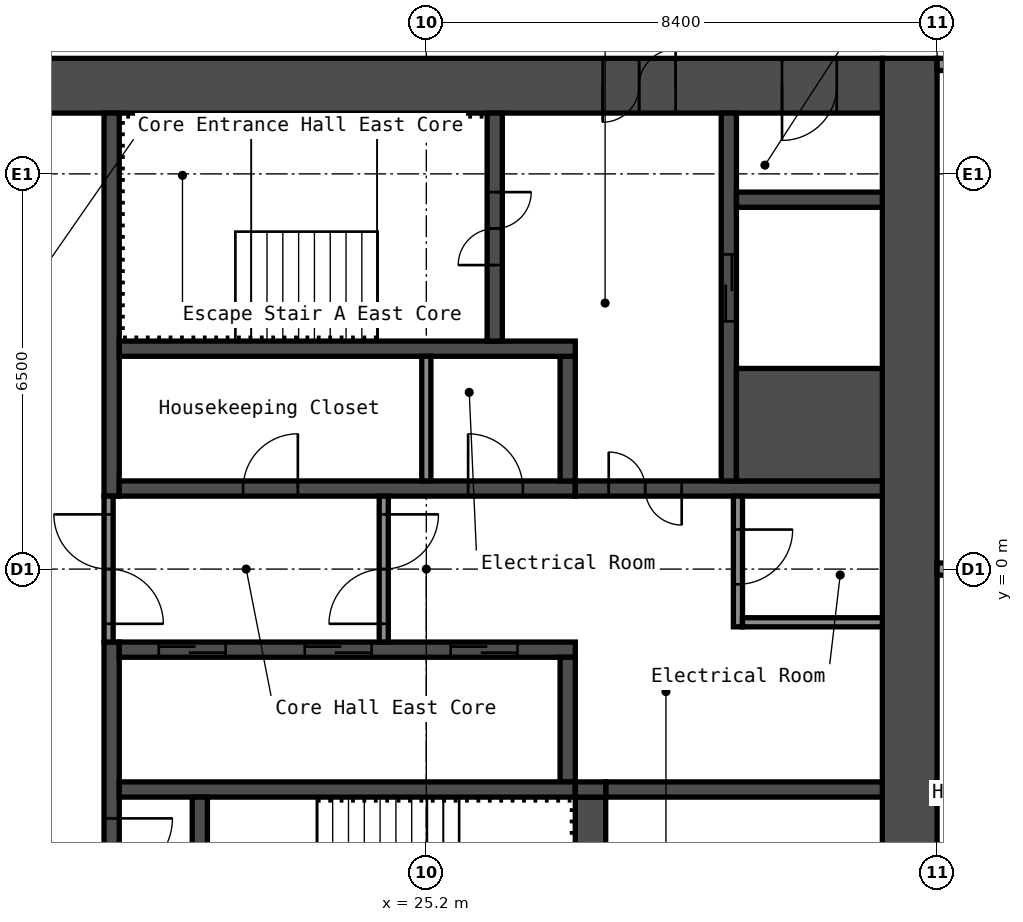
"""IFC4 building model, lengths in metres.
Left out: names, types, materials, properties, quantities, classifications, styles, units other than length and angle.
Written with IfcOpenShell. Run it as: python <this file> out.ifc"""

import sys

from ifc_helpers import new_model, si_unit, direction, frame, frame_2d, origin, place, context, subcontext, project, spatial, rectangle, extrude, element, fill, save


model = new_model("IFC4")
c1 = context("Model", 3, precision=1e-05, world=origin(), true_north=direction((0.0, 1.0)))
c2 = subcontext(c1, "Body", "Model", "MODEL_VIEW")
j1 = project(units=[si_unit("LENGTHUNIT", "METRE"), si_unit("PLANEANGLEUNIT", "RADIAN")], contexts=[c1])
p1 = place(None, origin())
s1 = spatial("IfcSite", under=j1, at=p1, CompositionType="ELEMENT")
p2 = place(p1, origin())
s2 = spatial("IfcBuilding", under=s1, at=p2, CompositionType="ELEMENT")
p3 = place(p2, frame((0.0, 0.0, 172.6)))
s3 = spatial("IfcBuildingStorey", under=s2, at=p3, CompositionType="ELEMENT", Elevation=172.6)
p4 = place(p3, frame((33.15, -8.4, 0.0), z_axis=(0.0, 0.0, 1.0), x_axis=(0.0, 1.0, 0.0)))
e1 = element("IfcWall", 1, at=p4, inside=s3, PredefinedType="SHEAR", context=c2, shape_type="SweptSolid", body=[
    extrude(rectangle(XDim=16.8, YDim=0.9, at=frame_2d((8.4, 0.0))), origin(), (0.0, 0.0, 1.0), 2.9),
])
p5 = place(p3, frame((17.7, 7.95, 0.0), z_axis=(0.0, 0.0, 1.0), x_axis=(1.0, 0.0, 0.0)))
e2 = element("IfcWall", 2, at=p5, inside=s3, PredefinedType="SHEAR", context=c2, shape_type="SweptSolid", body=[
    extrude(rectangle(XDim=15.0, YDim=0.9, at=frame_2d((7.5, 0.0))), origin(), (0.0, 0.0, 1.0), 2.9),
])
p6 = place(p5, frame((10.4, 0.0, 0.0)))
e3 = element("IfcOpeningElement", 3, at=p6, cuts=e2, PredefinedType="OPENING", context=c2, shape_type="SweptSolid", body=[
    extrude(rectangle(XDim=1.2, YDim=2.1, at=frame_2d((0.6, 1.05))), frame((0.0, 0.46, 0.0), z_axis=(0.0, -1.0, 0.0), x_axis=(1.0, 0.0, 0.0)), (0.0, 0.0, 1.0), 0.92),
])
p7 = place(p5, frame((13.35, 0.0, 0.0)))
e4 = element("IfcOpeningElement", 4, at=p7, cuts=e2, PredefinedType="OPENING", context=c2, shape_type="SweptSolid", body=[
    extrude(rectangle(XDim=0.9, YDim=2.1, at=frame_2d((0.45, 1.05))), frame((0.0, 0.46, 0.0), z_axis=(0.0, -1.0, 0.0), x_axis=(1.0, 0.0, 0.0)), (0.0, 0.0, 1.0), 0.92),
])
p8 = place(p3, frame((20.025, 1.2, 0.0), z_axis=(0.0, 0.0, 1.0), x_axis=(0.0, 1.0, 0.0)))
e5 = element("IfcWall", 5, at=p8, inside=s3, PredefinedType="SHEAR", context=c2, shape_type="SweptSolid", body=[
    extrude(rectangle(XDim=6.3, YDim=0.25, at=frame_2d((3.15, 0.0))), origin(), (0.0, 0.0, 1.0), 2.9),
])
p9 = place(p3, frame((20.025, -7.5, 0.0), z_axis=(0.0, 0.0, 1.0), x_axis=(0.0, 1.0, 0.0)))
e6 = element("IfcWall", 6, at=p9, inside=s3, PredefinedType="SHEAR", context=c2, shape_type="SweptSolid", body=[
    extrude(rectangle(XDim=6.3, YDim=0.25, at=frame_2d((3.15, 0.0))), origin(), (0.0, 0.0, 1.0), 2.9),
])
p10 = place(p9, frame((2.4, 0.0, 0.0)))
e7 = element("IfcOpeningElement", 7, at=p10, cuts=e6, PredefinedType="OPENING", context=c2, shape_type="SweptSolid", body=[
    extrude(rectangle(XDim=1.0, YDim=2.1, at=frame_2d((0.5, 1.05))), frame((0.0, 0.135, 0.0), z_axis=(0.0, -1.0, 0.0), x_axis=(1.0, 0.0, 0.0)), (0.0, 0.0, 1.0), 0.27),
])
p11 = place(p3, frame((20.15, 1.325, 0.0), z_axis=(0.0, 0.0, 1.0), x_axis=(1.0, 0.0, 0.0)))
e8 = element("IfcWall", 8, at=p11, inside=s3, PredefinedType="SHEAR", context=c2, shape_type="SweptSolid", body=[
    extrude(rectangle(XDim=7.5, YDim=0.25, at=frame_2d((3.75, 0.0))), origin(), (0.0, 0.0, 1.0), 2.9),
])
p12 = place(p11, frame((2.038, 0.0, 0.0)))
e9 = element("IfcOpeningElement", 9, at=p12, cuts=e8, PredefinedType="OPENING", context=c2, shape_type="SweptSolid", body=[
    extrude(rectangle(XDim=0.9, YDim=2.1, at=frame_2d((0.45, 1.05))), frame((0.0, 0.135, 0.0), z_axis=(0.0, -1.0, 0.0), x_axis=(1.0, 0.0, 0.0)), (0.0, 0.0, 1.0), 0.27),
])
p13 = place(p11, frame((5.738, 0.0, 0.0)))
e10 = element("IfcOpeningElement", 10, at=p13, cuts=e8, PredefinedType="OPENING", context=c2, shape_type="SweptSolid", body=[
    extrude(rectangle(XDim=0.9, YDim=2.1, at=frame_2d((0.45, 1.05))), frame((0.0, 0.135, 0.0), z_axis=(0.0, -1.0, 0.0), x_axis=(1.0, 0.0, 0.0)), (0.0, 0.0, 1.0), 0.27),
])
p14 = place(p3, frame((27.525, 1.45, 0.0), z_axis=(0.0, 0.0, 1.0), x_axis=(0.0, 1.0, 0.0)))
e11 = element("IfcWall", 11, at=p14, inside=s3, PredefinedType="SHEAR", context=c2, shape_type="SweptSolid", body=[
    extrude(rectangle(XDim=2.05, YDim=0.25, at=frame_2d((1.025, 0.0))), origin(), (0.0, 0.0, 1.0), 2.9),
])
p15 = place(p3, frame((20.15, 3.625, 0.0), z_axis=(0.0, 0.0, 1.0), x_axis=(1.0, 0.0, 0.0)))
e12 = element("IfcWall", 12, at=p15, inside=s3, PredefinedType="SHEAR", context=c2, shape_type="SweptSolid", body=[
    extrude(rectangle(XDim=7.5, YDim=0.25, at=frame_2d((3.75, 0.0))), origin(), (0.0, 0.0, 1.0), 2.9),
])
p16 = place(p3, frame((26.325, 3.75, 0.0), z_axis=(0.0, 0.0, 1.0), x_axis=(0.0, 1.0, 0.0)))
e13 = element("IfcWall", 13, at=p16, inside=s3, PredefinedType="SHEAR", context=c2, shape_type="SweptSolid", body=[
    extrude(rectangle(XDim=3.75, YDim=0.25, at=frame_2d((1.875, 0.0))), origin(), (0.0, 0.0, 1.0), 2.9),
])
p17 = place(p16, frame((1.25, 0.0, 0.0)))
e14 = element("IfcOpeningElement", 14, at=p17, cuts=e13, PredefinedType="OPENING", context=c2, shape_type="SweptSolid", body=[
    extrude(rectangle(XDim=1.2, YDim=2.1, at=frame_2d((0.6, 1.05))), frame((0.0, 0.135, 0.0), z_axis=(0.0, -1.0, 0.0), x_axis=(1.0, 0.0, 0.0)), (0.0, 0.0, 1.0), 0.27),
])
p18 = place(p3, frame((27.65, 1.325, 0.0), z_axis=(0.0, 0.0, 1.0), x_axis=(1.0, 0.0, 0.0)))
e15 = element("IfcWall", 15, at=p18, inside=s3, PredefinedType="SHEAR", context=c2, shape_type="SweptSolid", body=[
    extrude(rectangle(XDim=5.05, YDim=0.25, at=frame_2d((2.525, 0.0))), origin(), (0.0, 0.0, 1.0), 2.9),
])
p19 = place(p18, frame((0.55, 0.0, 0.0)))
e16 = element("IfcOpeningElement", 16, at=p19, cuts=e15, PredefinedType="OPENING", context=c2, shape_type="SweptSolid", body=[
    extrude(rectangle(XDim=1.2, YDim=2.1, at=frame_2d((0.6, 1.05))), frame((0.0, 0.135, 0.0), z_axis=(0.0, -1.0, 0.0), x_axis=(1.0, 0.0, 0.0)), (0.0, 0.0, 1.0), 0.27),
])
p20 = place(p3, frame((30.175, 1.45, 0.0), z_axis=(0.0, 0.0, 1.0), x_axis=(0.0, 1.0, 0.0)))
e17 = element("IfcWall", 17, at=p20, inside=s3, PredefinedType="SHEAR", context=c2, shape_type="SweptSolid", body=[
    extrude(rectangle(XDim=6.05, YDim=0.25, at=frame_2d((3.025, 0.0))), origin(), (0.0, 0.0, 1.0), 2.9),
])
p21 = place(p20, frame((2.625, 0.0, 0.0)))
e18 = element("IfcOpeningElement", 18, at=p21, cuts=e17, PredefinedType="OPENING", context=c2, shape_type="SweptSolid", body=[
    extrude(rectangle(XDim=1.1, YDim=2.1, at=frame_2d((0.55, 1.05))), frame((0.0, 0.135, 0.0), z_axis=(0.0, -1.0, 0.0), x_axis=(1.0, 0.0, 0.0)), (0.0, 0.0, 1.0), 0.27),
])
p22 = place(p3, frame((30.3, 2.375, 0.0), z_axis=(0.0, 0.0, 1.0), x_axis=(1.0, 0.0, 0.0)))
e19 = element("IfcWall", 19, at=p22, inside=s3, PredefinedType="SHEAR", context=c2, shape_type="SweptSolid", body=[
    extrude(rectangle(XDim=2.4, YDim=1.85, at=frame_2d((1.2, 0.0))), origin(), (0.0, 0.0, 1.0), 2.9),
])
p23 = place(p3, frame((30.3, 6.075, 0.0), z_axis=(0.0, 0.0, 1.0), x_axis=(1.0, 0.0, 0.0)))
e20 = element("IfcWall", 20, at=p23, inside=s3, PredefinedType="SHEAR", context=c2, shape_type="SweptSolid", body=[
    extrude(rectangle(XDim=2.4, YDim=0.25, at=frame_2d((1.2, 0.0))), origin(), (0.0, 0.0, 1.0), 2.9),
])
p24 = place(p3, frame((20.15, -1.325, 0.0), z_axis=(0.0, 0.0, 1.0), x_axis=(1.0, 0.0, 0.0)))
e21 = element("IfcWall", 21, at=p24, inside=s3, PredefinedType="SHEAR", context=c2, shape_type="SweptSolid", body=[
    extrude(rectangle(XDim=7.5, YDim=0.25, at=frame_2d((3.75, 0.0))), origin(), (0.0, 0.0, 1.0), 2.9),
])
p25 = place(p24, frame((0.65, 0.0, 0.0)))
e22 = element("IfcOpeningElement", 22, at=p25, cuts=e21, PredefinedType="OPENING", context=c2, shape_type="SweptSolid", body=[
    extrude(rectangle(XDim=1.1, YDim=2.1, at=frame_2d((0.55, 1.05))), frame((0.0, 0.135, 0.0), z_axis=(0.0, -1.0, 0.0), x_axis=(1.0, 0.0, 0.0)), (0.0, 0.0, 1.0), 0.27),
])
p26 = place(p24, frame((3.05, 0.0, 0.0)))
e23 = element("IfcOpeningElement", 23, at=p26, cuts=e21, PredefinedType="OPENING", context=c2, shape_type="SweptSolid", body=[
    extrude(rectangle(XDim=1.1, YDim=2.1, at=frame_2d((0.55, 1.05))), frame((0.0, 0.135, 0.0), z_axis=(0.0, -1.0, 0.0), x_axis=(1.0, 0.0, 0.0)), (0.0, 0.0, 1.0), 0.27),
])
p27 = place(p24, frame((5.45, 0.0, 0.0)))
e24 = element("IfcOpeningElement", 24, at=p27, cuts=e21, PredefinedType="OPENING", context=c2, shape_type="SweptSolid", body=[
    extrude(rectangle(XDim=1.1, YDim=2.1, at=frame_2d((0.55, 1.05))), frame((0.0, 0.135, 0.0), z_axis=(0.0, -1.0, 0.0), x_axis=(1.0, 0.0, 0.0)), (0.0, 0.0, 1.0), 0.27),
])
p28 = place(p3, frame((27.525, -3.5, 0.0), z_axis=(0.0, 0.0, 1.0), x_axis=(0.0, 1.0, 0.0)))
e25 = element("IfcWall", 25, at=p28, inside=s3, PredefinedType="SHEAR", context=c2, shape_type="SweptSolid", body=[
    extrude(rectangle(XDim=2.05, YDim=0.25, at=frame_2d((1.025, 0.0))), origin(), (0.0, 0.0, 1.0), 2.9),
])
p29 = place(p3, frame((20.15, -3.625, 0.0), z_axis=(0.0, 0.0, 1.0), x_axis=(1.0, 0.0, 0.0)))
e26 = element("IfcWall", 26, at=p29, inside=s3, PredefinedType="SHEAR", context=c2, shape_type="SweptSolid", body=[
    extrude(rectangle(XDim=7.5, YDim=0.25, at=frame_2d((3.75, 0.0))), origin(), (0.0, 0.0, 1.0), 2.9),
])
p30 = place(p3, frame((21.475, -7.5, 0.0), z_axis=(0.0, 0.0, 1.0), x_axis=(0.0, 1.0, 0.0)))
e27 = element("IfcWall", 27, at=p30, inside=s3, PredefinedType="SHEAR", context=c2, shape_type="SweptSolid", body=[
    extrude(rectangle(XDim=3.75, YDim=0.25, at=frame_2d((1.875, 0.0))), origin(), (0.0, 0.0, 1.0), 2.9),
])
p31 = place(p30, frame((1.3, 0.0, 0.0)))
e28 = element("IfcOpeningElement", 28, at=p31, cuts=e27, PredefinedType="OPENING", context=c2, shape_type="SweptSolid", body=[
    extrude(rectangle(XDim=1.2, YDim=2.1, at=frame_2d((0.6, 1.05))), frame((0.0, 0.135, 0.0), z_axis=(0.0, -1.0, 0.0), x_axis=(1.0, 0.0, 0.0)), (0.0, 0.0, 1.0), 0.27),
])
p32 = place(p3, frame((27.9, -7.5, 0.0), z_axis=(0.0, 0.0, 1.0), x_axis=(0.0, 1.0, 0.0)))
e29 = element("IfcWall", 29, at=p32, inside=s3, PredefinedType="SHEAR", context=c2, shape_type="SweptSolid", body=[
    extrude(rectangle(XDim=3.75, YDim=0.5, at=frame_2d((1.875, 0.0))), origin(), (0.0, 0.0, 1.0), 2.9),
])
p33 = place(p3, frame((28.15, -3.625, 0.0), z_axis=(0.0, 0.0, 1.0), x_axis=(1.0, 0.0, 0.0)))
e30 = element("IfcWall", 30, at=p33, inside=s3, PredefinedType="SHEAR", context=c2, shape_type="SweptSolid", body=[
    extrude(rectangle(XDim=4.55, YDim=0.25, at=frame_2d((2.275, 0.0))), origin(), (0.0, 0.0, 1.0), 2.9),
])
p34 = place(p3, frame((27.65, -3.625, 0.0), z_axis=(0.0, 0.0, 1.0), x_axis=(1.0, 0.0, 0.0)))
e31 = element("IfcWall", 31, at=p34, inside=s3, PredefinedType="SHEAR", context=c2, shape_type="SweptSolid", body=[
    extrude(rectangle(XDim=0.5, YDim=0.25, at=frame_2d((0.25, 0.0))), origin(), (0.0, 0.0, 1.0), 2.9),
])
p35 = place(p3, frame((19.975, -1.2, 0.0), z_axis=(0.0, 0.0, 1.0), x_axis=(0.0, 1.0, 0.0)))
e32 = element("IfcWall", 32, at=p35, inside=s3, PredefinedType="PARTITIONING", context=c2, shape_type="SweptSolid", body=[
    extrude(rectangle(XDim=2.4, YDim=0.15, at=frame_2d((1.2, 0.0))), origin(), (0.0, 0.0, 1.0), 2.9),
])
p36 = place(p35, frame((0.3, 0.0, 0.0)))
e33 = element("IfcOpeningElement", 33, at=p36, cuts=e32, PredefinedType="OPENING", context=c2, shape_type="SweptSolid", body=[
    extrude(rectangle(XDim=1.8, YDim=2.1, at=frame_2d((0.9, 1.05))), frame((0.0, 0.085, 0.0), z_axis=(0.0, -1.0, 0.0), x_axis=(1.0, 0.0, 0.0)), (0.0, 0.0, 1.0), 0.17),
])
p37 = place(p3, frame((24.5, -1.2, 0.0), z_axis=(0.0, 0.0, 1.0), x_axis=(0.0, 1.0, 0.0)))
e34 = element("IfcWall", 34, at=p37, inside=s3, PredefinedType="PARTITIONING", context=c2, shape_type="SweptSolid", body=[
    extrude(rectangle(XDim=2.4, YDim=0.15, at=frame_2d((1.2, 0.0))), origin(), (0.0, 0.0, 1.0), 2.9),
])
p38 = place(p37, frame((0.3, 0.0, 0.0)))
e35 = element("IfcOpeningElement", 35, at=p38, cuts=e34, PredefinedType="OPENING", context=c2, shape_type="SweptSolid", body=[
    extrude(rectangle(XDim=1.8, YDim=2.1, at=frame_2d((0.9, 1.05))), frame((0.0, 0.085, 0.0), z_axis=(0.0, -1.0, 0.0), x_axis=(1.0, 0.0, 0.0)), (0.0, 0.0, 1.0), 0.17),
])
p39 = place(p3, frame((30.325, -0.95, 0.0), z_axis=(0.0, 0.0, 1.0), x_axis=(0.0, 1.0, 0.0)))
e36 = element("IfcWall", 36, at=p39, inside=s3, PredefinedType="PARTITIONING", context=c2, shape_type="SweptSolid", body=[
    extrude(rectangle(XDim=2.15, YDim=0.15, at=frame_2d((1.075, 0.0))), origin(), (0.0, 0.0, 1.0), 2.9),
])
p40 = place(p39, frame((0.7, 0.0, 0.0)))
e37 = element("IfcOpeningElement", 37, at=p40, cuts=e36, PredefinedType="OPENING", context=c2, shape_type="SweptSolid", body=[
    extrude(rectangle(XDim=0.9, YDim=2.1, at=frame_2d((0.45, 1.05))), frame((0.0, 0.085, 0.0), z_axis=(0.0, -1.0, 0.0), x_axis=(1.0, 0.0, 0.0)), (0.0, 0.0, 1.0), 0.17),
])
p41 = place(p3, frame((30.4, -0.875, 0.0), z_axis=(0.0, 0.0, 1.0), x_axis=(1.0, 0.0, 0.0)))
e38 = element("IfcWall", 38, at=p41, inside=s3, PredefinedType="PARTITIONING", context=c2, shape_type="SweptSolid", body=[
    extrude(rectangle(XDim=2.3, YDim=0.15, at=frame_2d((1.15, 0.0))), origin(), (0.0, 0.0, 1.0), 2.9),
])
p42 = place(p3, frame((25.2, 1.45, 0.0), z_axis=(0.0, 0.0, 1.0), x_axis=(0.0, 1.0, 0.0)))
e39 = element("IfcWall", 39, at=p42, inside=s3, PredefinedType="PARTITIONING", context=c2, shape_type="SweptSolid", body=[
    extrude(rectangle(XDim=2.05, YDim=0.15, at=frame_2d((1.025, 0.0))), origin(), (0.0, 0.0, 1.0), 2.9),
])
p43 = place(p3, frame((33.6, 0.0, 0.0), z_axis=(0.0, 0.0, 1.0), x_axis=(1.0, 0.0, 0.0)))
e40 = element("IfcWall", 40, at=p43, inside=s3, PredefinedType="PARTITIONING", context=c2, shape_type="SweptSolid", body=[
    extrude(rectangle(XDim=6.5, YDim=0.2, at=frame_2d((3.25, 0.0))), origin(), (0.0, 0.0, 1.0), 2.9),
])
p44 = place(p3, frame((33.6, 8.3, 0.0), z_axis=(0.0, 0.0, 1.0), x_axis=(1.0, 0.0, 0.0)))
e41 = element("IfcWall", 41, at=p44, inside=s3, PredefinedType="PARTITIONING", context=c2, shape_type="SweptSolid", body=[
    extrude(rectangle(XDim=6.6, YDim=0.2, at=frame_2d((3.3, 0.0))), origin(), (0.0, 0.0, 1.0), 2.9),
])
p45 = place(p44, frame((0.935, 0.0, 0.0)))
e42 = element("IfcOpeningElement", 42, at=p45, cuts=e41, PredefinedType="OPENING", context=c2, shape_type="SweptSolid", body=[
    extrude(rectangle(XDim=0.9, YDim=2.1, at=frame_2d((0.45, 1.05))), frame((0.0, 0.11, 0.0), z_axis=(0.0, -1.0, 0.0), x_axis=(1.0, 0.0, 0.0)), (0.0, 0.0, 1.0), 0.22),
])
p46 = place(p44, frame((4.235, 0.0, 0.0)))
e43 = element("IfcOpeningElement", 43, at=p46, cuts=e41, PredefinedType="OPENING", context=c2, shape_type="SweptSolid", body=[
    extrude(rectangle(XDim=0.9, YDim=2.1, at=frame_2d((0.45, 1.05))), frame((0.0, 0.11, 0.0), z_axis=(0.0, -1.0, 0.0), x_axis=(1.0, 0.0, 0.0)), (0.0, 0.0, 1.0), 0.22),
])
p47 = place(p6, origin())
e44 = element("IfcDoor", 44, at=p47, inside=s3, OperationType="DOUBLE_DOOR_SINGLE_SWING", PredefinedType="DOOR", context=c2, shape_type="SweptSolid", body=[
    extrude(rectangle(XDim=1.2, YDim=2.1, at=frame_2d((0.6, 1.05))), frame((0.0, 0.025, 0.0), z_axis=(0.0, -1.0, 0.0), x_axis=(1.0, 0.0, 0.0)), (0.0, 0.0, 1.0), 0.05),
])
fill(e3, e44)
p48 = place(p7, origin())
e45 = element("IfcDoor", 45, at=p48, inside=s3, OperationType="SINGLE_SWING_LEFT", PredefinedType="DOOR", context=c2, shape_type="SweptSolid", body=[
    extrude(rectangle(XDim=0.9, YDim=2.1, at=frame_2d((0.45, 1.05))), frame((0.0, 0.025, 0.0), z_axis=(0.0, -1.0, 0.0), x_axis=(1.0, 0.0, 0.0)), (0.0, 0.0, 1.0), 0.05),
])
fill(e4, e45)
p49 = place(p17, origin())
e46 = element("IfcDoor", 46, at=p49, inside=s3, OperationType="DOUBLE_DOOR_SINGLE_SWING", PredefinedType="DOOR", context=c2, shape_type="SweptSolid", body=[
    extrude(rectangle(XDim=1.2, YDim=2.1, at=frame_2d((0.6, 1.05))), frame((0.0, 0.025, 0.0), z_axis=(0.0, -1.0, 0.0), x_axis=(1.0, 0.0, 0.0)), (0.0, 0.0, 1.0), 0.05),
])
fill(e14, e46)
p50 = place(p10, origin())
e47 = element("IfcDoor", 47, at=p50, inside=s3, OperationType="SINGLE_SWING_RIGHT", PredefinedType="DOOR", context=c2, shape_type="SweptSolid", body=[
    extrude(rectangle(XDim=1.0, YDim=2.1, at=frame_2d((0.5, 1.05))), frame((0.0, 0.025, 0.0), z_axis=(0.0, -1.0, 0.0), x_axis=(1.0, 0.0, 0.0)), (0.0, 0.0, 1.0), 0.05),
])
fill(e7, e47)
p51 = place(p19, origin())
e48 = element("IfcDoor", 48, at=p51, inside=s3, OperationType="DOUBLE_DOOR_SINGLE_SWING", PredefinedType="DOOR", context=c2, shape_type="SweptSolid", body=[
    extrude(rectangle(XDim=1.2, YDim=2.1, at=frame_2d((0.6, 1.05))), frame((0.0, 0.025, 0.0), z_axis=(0.0, -1.0, 0.0), x_axis=(1.0, 0.0, 0.0)), (0.0, 0.0, 1.0), 0.05),
])
fill(e16, e48)
p52 = place(p36, origin())
e49 = element("IfcDoor", 49, at=p52, inside=s3, OperationType="DOUBLE_DOOR_SINGLE_SWING", PredefinedType="DOOR", context=c2, shape_type="SweptSolid", body=[
    extrude(rectangle(XDim=1.8, YDim=2.1, at=frame_2d((0.9, 1.05))), frame((0.0, 0.025, 0.0), z_axis=(0.0, -1.0, 0.0), x_axis=(1.0, 0.0, 0.0)), (0.0, 0.0, 1.0), 0.05),
])
fill(e33, e49)
p53 = place(p38, origin())
e50 = element("IfcDoor", 50, at=p53, inside=s3, OperationType="DOUBLE_DOOR_SINGLE_SWING", PredefinedType="DOOR", context=c2, shape_type="SweptSolid", body=[
    extrude(rectangle(XDim=1.8, YDim=2.1, at=frame_2d((0.9, 1.05))), frame((0.0, 0.025, 0.0), z_axis=(0.0, -1.0, 0.0), x_axis=(1.0, 0.0, 0.0)), (0.0, 0.0, 1.0), 0.05),
])
fill(e35, e50)
p54 = place(p40, origin())
e51 = element("IfcDoor", 51, at=p54, inside=s3, OperationType="SINGLE_SWING_RIGHT", PredefinedType="DOOR", context=c2, shape_type="SweptSolid", body=[
    extrude(rectangle(XDim=0.9, YDim=2.1, at=frame_2d((0.45, 1.05))), frame((0.0, 0.025, 0.0), z_axis=(0.0, -1.0, 0.0), x_axis=(1.0, 0.0, 0.0)), (0.0, 0.0, 1.0), 0.05),
])
fill(e37, e51)
p55 = place(p12, origin())
e52 = element("IfcDoor", 52, at=p55, inside=s3, OperationType="SINGLE_SWING_LEFT", PredefinedType="DOOR", context=c2, shape_type="SweptSolid", body=[
    extrude(rectangle(XDim=0.9, YDim=2.1, at=frame_2d((0.45, 1.05))), frame((0.0, 0.025, 0.0), z_axis=(0.0, -1.0, 0.0), x_axis=(1.0, 0.0, 0.0)), (0.0, 0.0, 1.0), 0.05),
])
fill(e9, e52)
p56 = place(p13, origin())
e53 = element("IfcDoor", 53, at=p56, inside=s3, OperationType="SINGLE_SWING_RIGHT", PredefinedType="DOOR", context=c2, shape_type="SweptSolid", body=[
    extrude(rectangle(XDim=0.9, YDim=2.1, at=frame_2d((0.45, 1.05))), frame((0.0, 0.025, 0.0), z_axis=(0.0, -1.0, 0.0), x_axis=(1.0, 0.0, 0.0)), (0.0, 0.0, 1.0), 0.05),
])
fill(e10, e53)
p57 = place(p25, origin())
e54 = element("IfcDoor", 54, at=p57, inside=s3, OperationType="DOUBLE_DOOR_SLIDING", PredefinedType="DOOR", context=c2, shape_type="SweptSolid", body=[
    extrude(rectangle(XDim=1.1, YDim=2.1, at=frame_2d((0.55, 1.05))), frame((0.0, 0.025, 0.0), z_axis=(0.0, -1.0, 0.0), x_axis=(1.0, 0.0, 0.0)), (0.0, 0.0, 1.0), 0.05),
])
fill(e22, e54)
p58 = place(p26, origin())
e55 = element("IfcDoor", 55, at=p58, inside=s3, OperationType="DOUBLE_DOOR_SLIDING", PredefinedType="DOOR", context=c2, shape_type="SweptSolid", body=[
    extrude(rectangle(XDim=1.1, YDim=2.1, at=frame_2d((0.55, 1.05))), frame((0.0, 0.025, 0.0), z_axis=(0.0, -1.0, 0.0), x_axis=(1.0, 0.0, 0.0)), (0.0, 0.0, 1.0), 0.05),
])
fill(e23, e55)
p59 = place(p27, origin())
e56 = element("IfcDoor", 56, at=p59, inside=s3, OperationType="DOUBLE_DOOR_SLIDING", PredefinedType="DOOR", context=c2, shape_type="SweptSolid", body=[
    extrude(rectangle(XDim=1.1, YDim=2.1, at=frame_2d((0.55, 1.05))), frame((0.0, 0.025, 0.0), z_axis=(0.0, -1.0, 0.0), x_axis=(1.0, 0.0, 0.0)), (0.0, 0.0, 1.0), 0.05),
])
fill(e24, e56)
p60 = place(p21, origin())
e57 = element("IfcDoor", 57, at=p60, inside=s3, OperationType="DOUBLE_DOOR_SLIDING", PredefinedType="DOOR", context=c2, shape_type="SweptSolid", body=[
    extrude(rectangle(XDim=1.1, YDim=2.1, at=frame_2d((0.55, 1.05))), frame((0.0, 0.025, 0.0), z_axis=(0.0, -1.0, 0.0), x_axis=(1.0, 0.0, 0.0)), (0.0, 0.0, 1.0), 0.05),
])
fill(e18, e57)
save(model, sys.argv[1])
